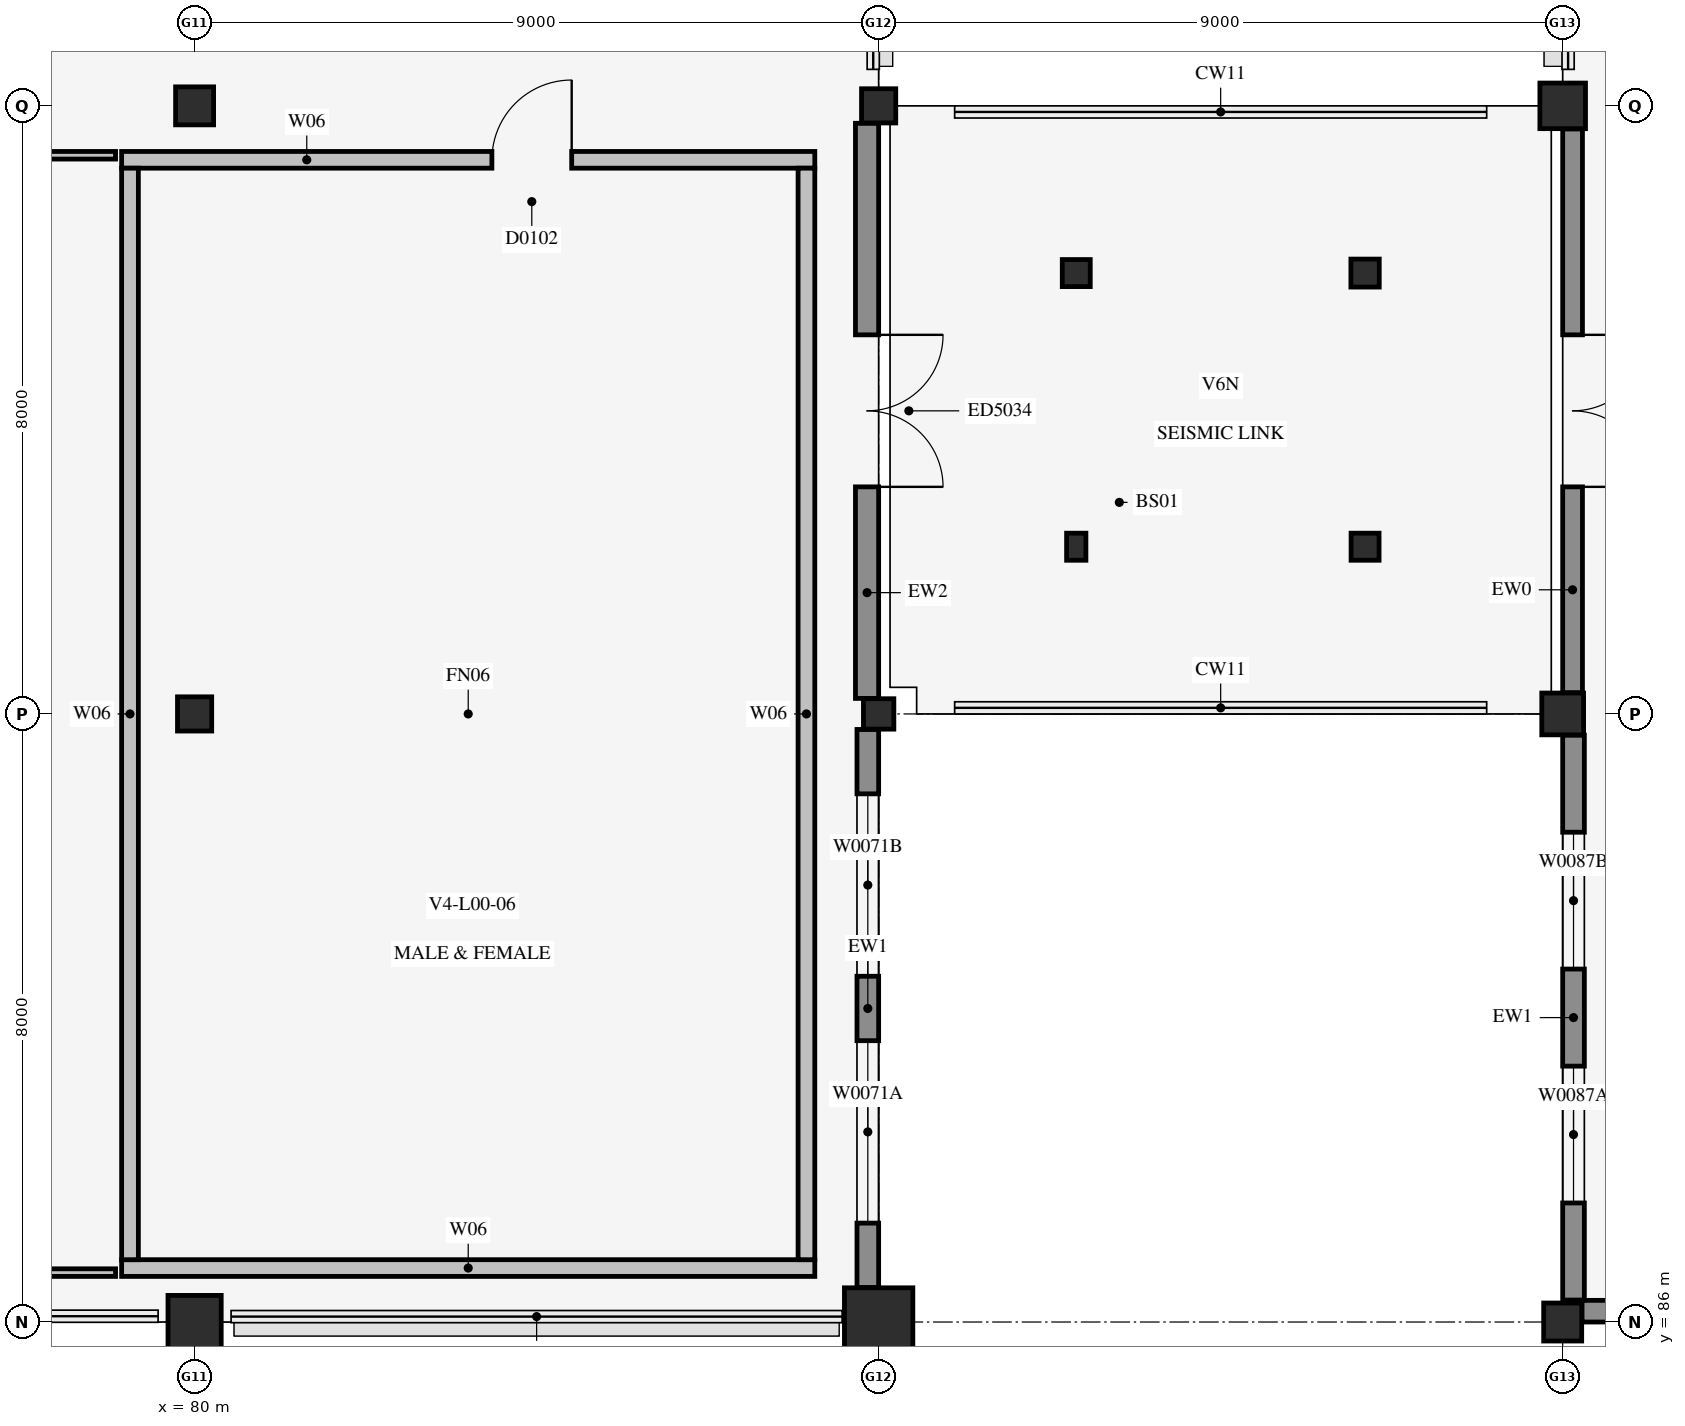
"""IFC4 building model, lengths in metres.
Left out: names, types, materials, properties, quantities, classifications, styles, units other than length and angle.
Written with IfcOpenShell. Run it as: python <this file> out.ifc"""

import sys

from ifc_helpers import new_model, si_unit, direction, frame, frame_2d, origin, origin_2d, place, context, subcontext, project, spatial, rectangle, circle, i_section, extrude, element, fill, save


model = new_model("IFC4")
c1 = context("Model", 3, precision=1e-05, world=origin(), true_north=direction((0.0, 1.0)))
c2 = subcontext(c1, "Body", "Model", "MODEL_VIEW")
j1 = project(units=[si_unit("LENGTHUNIT", "METRE"), si_unit("PLANEANGLEUNIT", "RADIAN")], contexts=[c1])
p1 = place(None, origin())
s1 = spatial("IfcSite", under=j1, at=p1, CompositionType="ELEMENT")
p2 = place(p1, origin())
s2 = spatial("IfcBuilding", under=s1, at=p2, CompositionType="ELEMENT")
p3 = place(p2, origin())
s3 = spatial("IfcBuildingStorey", under=s2, at=p3, CompositionType="ELEMENT", Elevation=0.0)
p4 = place(p3, frame((80.0, 86.0, 0.0), z_axis=(0.0, 0.0, 1.0), x_axis=(1.0, 0.0, 0.0)))
e1 = element("IfcColumn", 1, at=p4, inside=s3, PredefinedType="COLUMN", context=c2, shape_type="SweptSolid", body=[
    extrude(circle(Radius=0.35, at=origin_2d()), origin(), (0.0, 0.0, 1.0), 5.4),
])
p5 = place(p3, frame((80.0, 94.0, 0.0), z_axis=(0.0, 0.0, 1.0), x_axis=(1.0, 0.0, 0.0)))
e2 = element("IfcColumn", 2, at=p5, inside=s3, PredefinedType="COLUMN", context=c2, shape_type="SweptSolid", body=[
    extrude(rectangle(XDim=0.45, YDim=0.45, at=origin_2d()), origin(), (0.0, 0.0, 1.0), 5.4),
])
p6 = place(p3, frame((80.0, 102.0, 0.0), z_axis=(0.0, 0.0, 1.0), x_axis=(1.0, 0.0, 0.0)))
e3 = element("IfcColumn", 3, at=p6, inside=s3, PredefinedType="COLUMN", context=c2, shape_type="SweptSolid", body=[
    extrude(rectangle(XDim=0.5, YDim=0.5, at=origin_2d()), origin(), (0.0, 0.0, 1.0), 5.4),
])
p7 = place(p3, frame((89.0, 86.0, 0.0), z_axis=(0.0, 0.0, 1.0), x_axis=(1.0, 0.0, 0.0)))
e4 = element("IfcColumn", 4, at=p7, inside=s3, PredefinedType="COLUMN", context=c2, shape_type="SweptSolid", body=[
    extrude(circle(Radius=0.45, at=origin_2d()), origin(), (0.0, 0.0, 1.0), 5.4),
])
p8 = place(p3, frame((89.0, 94.0, 0.0), z_axis=(0.0, 0.0, 1.0), x_axis=(1.0, 0.0, 0.0)))
e5 = element("IfcColumn", 5, at=p8, inside=s3, PredefinedType="COLUMN", context=c2, shape_type="SweptSolid", body=[
    extrude(rectangle(XDim=0.4, YDim=0.4, at=origin_2d()), origin(), (0.0, 0.0, 1.0), 5.4),
])
p9 = place(p3, frame((89.0, 102.0, 0.0), z_axis=(0.0, 0.0, 1.0), x_axis=(1.0, 0.0, 0.0)))
e6 = element("IfcColumn", 6, at=p9, inside=s3, PredefinedType="COLUMN", context=c2, shape_type="SweptSolid", body=[
    extrude(rectangle(XDim=0.45, YDim=0.45, at=origin_2d()), origin(), (0.0, 0.0, 1.0), 5.4),
])
p10 = place(p3, frame((98.0, 86.0, 0.0), z_axis=(0.0, 0.0, 1.0), x_axis=(1.0, 0.0, 0.0)))
e7 = element("IfcColumn", 7, at=p10, inside=s3, PredefinedType="COLUMN", context=c2, shape_type="SweptSolid", body=[
    extrude(rectangle(XDim=0.5, YDim=0.5, at=origin_2d()), origin(), (0.0, 0.0, 1.0), 5.4),
])
p11 = place(p3, frame((98.0, 94.0, 0.0), z_axis=(0.0, 0.0, 1.0), x_axis=(1.0, 0.0, 0.0)))
e8 = element("IfcColumn", 8, at=p11, inside=s3, PredefinedType="COLUMN", context=c2, shape_type="SweptSolid", body=[
    extrude(rectangle(XDim=0.55, YDim=0.55, at=origin_2d()), origin(), (0.0, 0.0, 1.0), 5.4),
])
p12 = place(p3, frame((98.0, 102.0, 0.0), z_axis=(0.0, 0.0, 1.0), x_axis=(1.0, 0.0, 0.0)))
e9 = element("IfcColumn", 9, at=p12, inside=s3, PredefinedType="COLUMN", context=c2, shape_type="SweptSolid", body=[
    extrude(rectangle(XDim=0.6, YDim=0.6, at=origin_2d()), origin(), (0.0, 0.0, 1.0), 5.4),
])
p13 = place(p3, frame((91.6, 96.2, 0.0), z_axis=(0.0, 0.0, 1.0), x_axis=(1.0, 0.0, 0.0)))
e10 = element("IfcColumn", 10, at=p13, inside=s3, PredefinedType="COLUMN", context=c2, shape_type="SweptSolid", body=[
    extrude(i_section(OverallWidth=0.254, OverallDepth=0.356, WebThickness=0.011, FlangeThickness=0.018, FilletRadius=0.014, at=origin_2d()), origin(), (0.0, 0.0, 1.0), 5.4),
])
for number, where, z_axis, x_axis in (
    (11, (91.6, 99.8, 0.0), (0.0, 0.0, 1.0), (1.0, 0.0, 0.0)),
    (12, (95.4, 96.2, 0.0), (0.0, 0.0, 1.0), (1.0, 0.0, 0.0)),
):
    element("IfcColumn", number, at=place(p3, frame(where, z_axis=z_axis, x_axis=x_axis)), inside=s3, PredefinedType="COLUMN", context=c2, shape_type="SweptSolid", body=[
        extrude(i_section(OverallWidth=0.368, OverallDepth=0.356, WebThickness=0.011, FlangeThickness=0.018, FilletRadius=0.014, at=origin_2d()), origin(), (0.0, 0.0, 1.0), 5.4),
    ])
p14 = place(p3, frame((95.4, 99.8, 0.0), z_axis=(0.0, 0.0, 1.0), x_axis=(1.0, 0.0, 0.0)))
e13 = element("IfcColumn", 13, at=p14, inside=s3, PredefinedType="COLUMN", context=c2, shape_type="SweptSolid", body=[
    extrude(i_section(OverallWidth=0.373, OverallDepth=0.368, WebThickness=0.015, FlangeThickness=0.024, FilletRadius=0.014, at=origin_2d()), origin(), (0.0, 0.0, 1.0), 5.4),
])
p15 = place(p3, frame((69.84, 86.65, 0.0), z_axis=(0.0, 0.0, 1.0), x_axis=(1.0, 0.0, 0.0)))
e14 = element("IfcWall", 14, at=p15, inside=s3, PredefinedType="PARTITIONING", context=c2, shape_type="SweptSolid", body=[
    extrude(rectangle(XDim=9.12, YDim=0.1, at=frame_2d((4.56, 0.0))), origin(), (0.0, 0.0, 1.0), 5.145),
])
p16 = place(p3, frame((69.84, 101.35, 0.0), z_axis=(0.0, 0.0, 1.0), x_axis=(1.0, 0.0, 0.0)))
e15 = element("IfcWall", 15, at=p16, inside=s3, PredefinedType="PARTITIONING", context=c2, shape_type="SweptSolid", body=[
    extrude(rectangle(XDim=9.12, YDim=0.1, at=frame_2d((4.56, 0.0))), origin(), (0.0, 0.0, 1.0), 5.145),
])
p17 = place(p16, frame((4.933, 0.0, 0.0)))
e16 = element("IfcOpeningElement", 16, at=p17, cuts=e15, PredefinedType="OPENING", context=c2, shape_type="SweptSolid", body=[
    extrude(rectangle(XDim=0.95, YDim=2.15, at=frame_2d((0.475, 1.075))), frame((0.0, 0.062, 0.0), z_axis=(0.0, -1.0, 0.0), x_axis=(1.0, 0.0, 0.0)), (0.0, 0.0, 1.0), 0.124),
])
p18 = place(p3, frame((79.04, 86.71, 0.0), z_axis=(0.0, 0.0, 1.0), x_axis=(1.0, 0.0, 0.0)))
e17 = element("IfcWall", 17, at=p18, inside=s3, PredefinedType="PLUMBINGWALL", context=c2, shape_type="SweptSolid", body=[
    extrude(rectangle(XDim=9.12, YDim=0.22, at=frame_2d((4.56, 0.0))), origin(), (0.0, 0.0, 1.0), 5.145),
])
p19 = place(p3, frame((79.04, 101.29, 0.0), z_axis=(0.0, 0.0, 1.0), x_axis=(1.0, 0.0, 0.0)))
e18 = element("IfcWall", 18, at=p19, inside=s3, PredefinedType="PLUMBINGWALL", context=c2, shape_type="SweptSolid", body=[
    extrude(rectangle(XDim=9.12, YDim=0.22, at=frame_2d((4.56, 0.0))), origin(), (0.0, 0.0, 1.0), 5.145),
])
p20 = place(p19, frame((4.871, 0.0, 0.0)))
e19 = element("IfcOpeningElement", 19, at=p20, cuts=e18, PredefinedType="OPENING", context=c2, shape_type="SweptSolid", body=[
    extrude(rectangle(XDim=1.05, YDim=2.15, at=frame_2d((0.525, 1.075))), frame((0.0, 0.122, 0.0), z_axis=(0.0, -1.0, 0.0), x_axis=(1.0, 0.0, 0.0)), (0.0, 0.0, 1.0), 0.244),
])
for number, where, z_axis, x_axis in (
    (20, (88.05, 86.82, 0.0), (0.0, 0.0, 1.0), (0.0, 1.0, 0.0)),
    (21, (79.15, 86.82, 0.0), (0.0, 0.0, 1.0), (0.0, 1.0, 0.0)),
):
    element("IfcWall", number, at=place(p3, frame(where, z_axis=z_axis, x_axis=x_axis)), inside=s3, PredefinedType="PLUMBINGWALL", context=c2, shape_type="SweptSolid", body=[
        extrude(rectangle(XDim=14.36, YDim=0.22, at=frame_2d((7.18, 0.0))), origin(), (0.0, 0.0, 1.0), 5.145),
    ])
p21 = place(p3, frame((88.857, 86.454, 0.0), z_axis=(0.0, 0.0, 1.0), x_axis=(0.0, 1.0, 0.0)))
e22 = element("IfcWall", 22, at=p21, inside=s3, PredefinedType="SOLIDWALL", context=c2, shape_type="SweptSolid", body=[
    extrude(rectangle(XDim=7.342, YDim=0.285, at=frame_2d((3.671, 0.0))), origin(), (0.0, 0.0, 1.0), 4.518),
])
p22 = place(p21, frame((0.847, 0.0, 0.95)))
e23 = element("IfcOpeningElement", 23, at=p22, cuts=e22, PredefinedType="OPENING", context=c2, shape_type="SweptSolid", body=[
    extrude(rectangle(XDim=2.4, YDim=1.8, at=frame_2d((1.2, 0.9))), frame((0.0, 0.154, 0.0), z_axis=(0.0, -1.0, 0.0), x_axis=(1.0, 0.0, 0.0)), (0.0, 0.0, 1.0), 0.309),
])
p23 = place(p21, frame((4.095, 0.0, 0.95)))
e24 = element("IfcOpeningElement", 24, at=p23, cuts=e22, PredefinedType="OPENING", context=c2, shape_type="SweptSolid", body=[
    extrude(rectangle(XDim=2.4, YDim=1.8, at=frame_2d((1.2, 0.9))), frame((0.0, 0.154, 0.0), z_axis=(0.0, -1.0, 0.0), x_axis=(1.0, 0.0, 0.0)), (0.0, 0.0, 1.0), 0.309),
])
p24 = place(p3, frame((88.847, 94.204, 0.0), z_axis=(0.0, 0.0, 1.0), x_axis=(0.0, 1.0, 0.0)))
e25 = element("IfcWall", 25, at=p24, inside=s3, PredefinedType="SOLIDWALL", context=c2, shape_type="SweptSolid", body=[
    extrude(rectangle(XDim=7.567, YDim=0.305, at=frame_2d((3.783, 0.0))), origin(), (0.0, 0.0, 1.0), 4.717),
])
p25 = place(p24, frame((2.783, 0.0, 0.0)))
e26 = element("IfcOpeningElement", 26, at=p25, cuts=e25, PredefinedType="OPENING", context=c2, shape_type="SweptSolid", body=[
    extrude(rectangle(XDim=2.0, YDim=2.4, at=frame_2d((1.0, 1.2))), frame((0.0, 0.165, 0.0), z_axis=(0.0, -1.0, 0.0), x_axis=(1.0, 0.0, 0.0)), (0.0, 0.0, 1.0), 0.329),
])
p26 = place(p3, frame((98.254, 86.143, 0.0), z_axis=(0.0, 0.0, 1.0), x_axis=(1.0, 0.0, 0.0)))
e27 = element("IfcWall", 27, at=p26, inside=s3, PredefinedType="SOLIDWALL", context=c2, shape_type="SweptSolid", body=[
    extrude(rectangle(XDim=8.442, YDim=0.285, at=frame_2d((4.221, 0.0))), origin(), (0.0, 0.0, 1.0), 4.65),
])
p27 = place(p26, frame((1.614, 0.0, 0.95)))
e28 = element("IfcOpeningElement", 28, at=p27, cuts=e27, PredefinedType="OPENING", context=c2, shape_type="SweptSolid", body=[
    extrude(rectangle(XDim=1.8, YDim=1.5, at=frame_2d((0.9, 0.75))), frame((0.0, 0.154, 0.0), z_axis=(0.0, -1.0, 0.0), x_axis=(1.0, 0.0, 0.0)), (0.0, 0.0, 1.0), 0.309),
])
p28 = place(p26, frame((5.028, 0.0, 0.95)))
e29 = element("IfcOpeningElement", 29, at=p28, cuts=e27, PredefinedType="OPENING", context=c2, shape_type="SweptSolid", body=[
    extrude(rectangle(XDim=1.8, YDim=1.5, at=frame_2d((0.9, 0.75))), frame((0.0, 0.154, 0.0), z_axis=(0.0, -1.0, 0.0), x_axis=(1.0, 0.0, 0.0)), (0.0, 0.0, 1.0), 0.309),
])
p29 = place(p3, frame((98.143, 86.289, 0.0), z_axis=(0.0, 0.0, 1.0), x_axis=(0.0, 1.0, 0.0)))
e30 = element("IfcWall", 30, at=p29, inside=s3, PredefinedType="SOLIDWALL", context=c2, shape_type="SweptSolid", body=[
    extrude(rectangle(XDim=7.432, YDim=0.285, at=frame_2d((3.716, 0.0))), origin(), (0.0, 0.0, 1.0), 4.574),
])
p30 = place(p29, frame((1.277, 0.0, 0.95)))
e31 = element("IfcOpeningElement", 31, at=p30, cuts=e30, PredefinedType="OPENING", context=c2, shape_type="SweptSolid", body=[
    extrude(rectangle(XDim=1.8, YDim=1.8, at=frame_2d((0.9, 0.9))), frame((0.0, 0.154, 0.0), z_axis=(0.0, -1.0, 0.0), x_axis=(1.0, 0.0, 0.0)), (0.0, 0.0, 1.0), 0.309),
])
p31 = place(p29, frame((4.355, 0.0, 0.95)))
e32 = element("IfcOpeningElement", 32, at=p31, cuts=e30, PredefinedType="OPENING", context=c2, shape_type="SweptSolid", body=[
    extrude(rectangle(XDim=1.8, YDim=1.8, at=frame_2d((0.9, 0.9))), frame((0.0, 0.154, 0.0), z_axis=(0.0, -1.0, 0.0), x_axis=(1.0, 0.0, 0.0)), (0.0, 0.0, 1.0), 0.309),
])
p32 = place(p3, frame((98.13, 94.279, 0.0), z_axis=(0.0, 0.0, 1.0), x_axis=(0.0, 1.0, 0.0)))
e33 = element("IfcWall", 33, at=p32, inside=s3, PredefinedType="SOLIDWALL", context=c2, shape_type="SweptSolid", body=[
    extrude(rectangle(XDim=7.417, YDim=0.26, at=frame_2d((3.708, 0.0))), origin(), (0.0, 0.0, 1.0), 4.498),
])
p33 = place(p32, frame((2.708, 0.0, 0.0)))
e34 = element("IfcOpeningElement", 34, at=p33, cuts=e33, PredefinedType="OPENING", context=c2, shape_type="SweptSolid", body=[
    extrude(rectangle(XDim=2.0, YDim=2.4, at=frame_2d((1.0, 1.2))), frame((0.0, 0.142, 0.0), z_axis=(0.0, -1.0, 0.0), x_axis=(1.0, 0.0, 0.0)), (0.0, 0.0, 1.0), 0.284),
])
p34 = place(p20, frame((1.05, 0.0, 0.0), z_axis=(0.0, 0.0, 1.0), x_axis=(-1.0, 0.0, 0.0)))
e35 = element("IfcDoor", 35, at=p34, inside=s3, OperationType="SINGLE_SWING_RIGHT", PredefinedType="DOOR", context=c2, shape_type="SweptSolid", body=[
    extrude(rectangle(XDim=1.05, YDim=2.15, at=frame_2d((0.525, 1.075))), frame((0.0, 0.025, 0.0), z_axis=(0.0, -1.0, 0.0), x_axis=(1.0, 0.0, 0.0)), (0.0, 0.0, 1.0), 0.05),
])
fill(e19, e35)
p35 = place(p22, origin())
e36 = element("IfcWindow", 36, at=p35, inside=s3, PartitioningType="SINGLE_PANEL", PredefinedType="WINDOW", context=c2, shape_type="SweptSolid", body=[
    extrude(rectangle(XDim=2.4, YDim=1.8, at=frame_2d((1.2, 0.9))), frame((0.0, 0.03, 0.0), z_axis=(0.0, -1.0, 0.0), x_axis=(1.0, 0.0, 0.0)), (0.0, 0.0, 1.0), 0.06),
])
fill(e23, e36)
p36 = place(p23, origin())
e37 = element("IfcWindow", 37, at=p36, inside=s3, PartitioningType="SINGLE_PANEL", PredefinedType="WINDOW", context=c2, shape_type="SweptSolid", body=[
    extrude(rectangle(XDim=2.4, YDim=1.8, at=frame_2d((1.2, 0.9))), frame((0.0, 0.03, 0.0), z_axis=(0.0, -1.0, 0.0), x_axis=(1.0, 0.0, 0.0)), (0.0, 0.0, 1.0), 0.06),
])
fill(e24, e37)
p37 = place(p25, frame((2.0, 0.0, 0.0), z_axis=(0.0, 0.0, 1.0), x_axis=(-1.0, 0.0, 0.0)))
e38 = element("IfcDoor", 38, at=p37, inside=s3, OperationType="DOUBLE_DOOR_SINGLE_SWING", PredefinedType="DOOR", context=c2, shape_type="SweptSolid", body=[
    extrude(rectangle(XDim=2.0, YDim=2.4, at=frame_2d((1.0, 1.2))), frame((0.0, 0.025, 0.0), z_axis=(0.0, -1.0, 0.0), x_axis=(1.0, 0.0, 0.0)), (0.0, 0.0, 1.0), 0.05),
])
fill(e26, e38)
p38 = place(p30, origin())
e39 = element("IfcWindow", 39, at=p38, inside=s3, PartitioningType="SINGLE_PANEL", PredefinedType="WINDOW", context=c2, shape_type="SweptSolid", body=[
    extrude(rectangle(XDim=1.8, YDim=1.8, at=frame_2d((0.9, 0.9))), frame((0.0, 0.03, 0.0), z_axis=(0.0, -1.0, 0.0), x_axis=(1.0, 0.0, 0.0)), (0.0, 0.0, 1.0), 0.06),
])
fill(e31, e39)
p39 = place(p31, origin())
e40 = element("IfcWindow", 40, at=p39, inside=s3, PartitioningType="SINGLE_PANEL", PredefinedType="WINDOW", context=c2, shape_type="SweptSolid", body=[
    extrude(rectangle(XDim=1.8, YDim=1.8, at=frame_2d((0.9, 0.9))), frame((0.0, 0.03, 0.0), z_axis=(0.0, -1.0, 0.0), x_axis=(1.0, 0.0, 0.0)), (0.0, 0.0, 1.0), 0.06),
])
fill(e32, e40)
p40 = place(p33, origin())
e41 = element("IfcDoor", 41, at=p40, inside=s3, OperationType="DOUBLE_DOOR_SINGLE_SWING", PredefinedType="DOOR", context=c2, shape_type="SweptSolid", body=[
    extrude(rectangle(XDim=2.0, YDim=2.4, at=frame_2d((1.0, 1.2))), frame((0.0, 0.025, 0.0), z_axis=(0.0, -1.0, 0.0), x_axis=(1.0, 0.0, 0.0)), (0.0, 0.0, 1.0), 0.05),
])
fill(e34, e41)
save(model, sys.argv[1])
